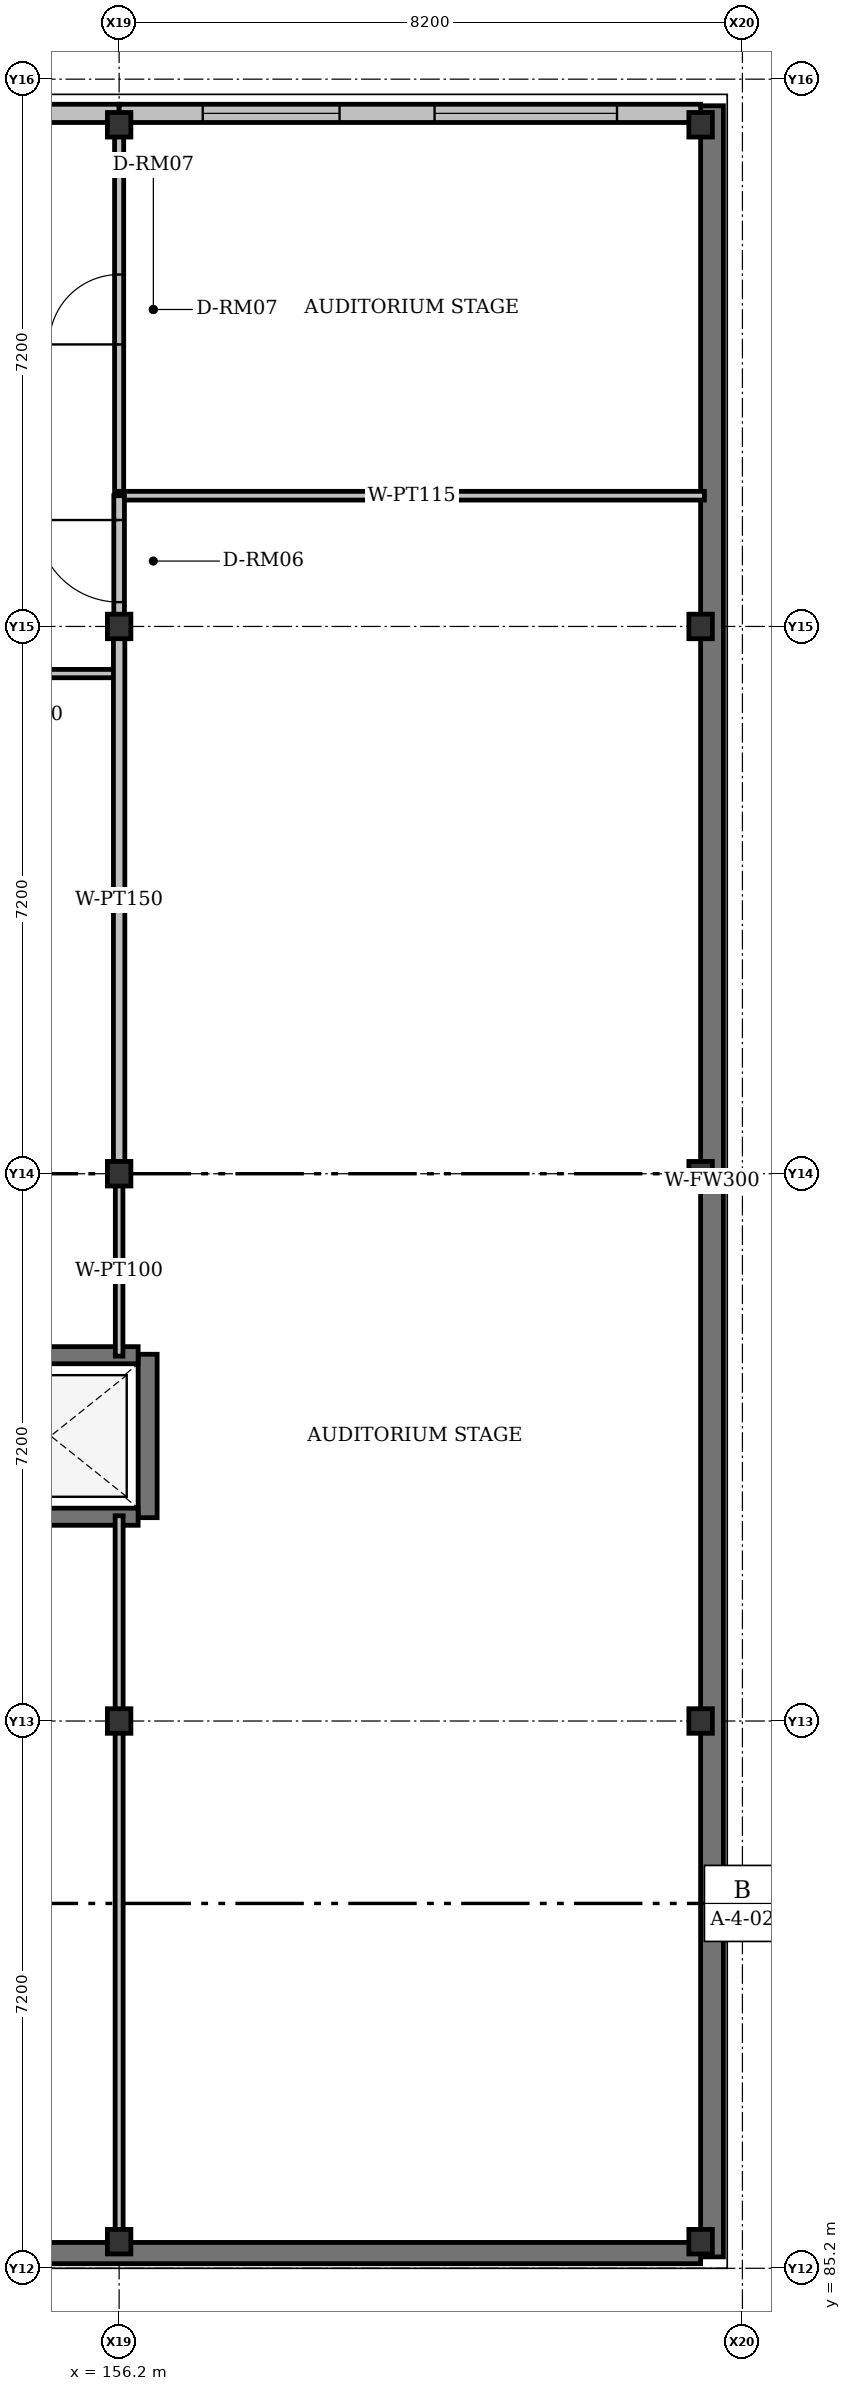
"""IFC4 building model, lengths in metres.
Left out: names, types, materials, properties, quantities, classifications, styles, units other than length and angle.
Written with IfcOpenShell. Run it as: python <this file> out.ifc"""

import sys

from ifc_helpers import new_model, si_unit, direction, frame, frame_2d, origin, origin_2d, place, context, subcontext, project, spatial, rectangle, i_section, extrude, element, fill, save


model = new_model("IFC4")
c1 = context("Model", 3, precision=1e-05, world=origin(), true_north=direction((0.0, 1.0)))
c2 = subcontext(c1, "Body", "Model", "MODEL_VIEW")
j1 = project(units=[si_unit("LENGTHUNIT", "METRE"), si_unit("PLANEANGLEUNIT", "RADIAN")], contexts=[c1])
p1 = place(None, origin())
s1 = spatial("IfcSite", under=j1, at=p1, CompositionType="ELEMENT")
p2 = place(p1, origin())
s2 = spatial("IfcBuilding", under=s1, at=p2, CompositionType="ELEMENT")
p3 = place(p2, origin())
s3 = spatial("IfcBuildingStorey", under=s2, at=p3, CompositionType="ELEMENT", Elevation=0.0)
for number, where, z_axis, x_axis in (
    (1, (156.2, 85.55, 0.0), (0.0, 0.0, 1.0), (1.0, 0.0, 0.0)),
    (2, (156.2, 92.4, 0.0), (0.0, 0.0, 1.0), (1.0, 0.0, 0.0)),
    (3, (156.2, 99.6, 0.0), (0.0, 0.0, 1.0), (1.0, 0.0, 0.0)),
    (4, (156.2, 106.8, 0.0), (0.0, 0.0, 1.0), (1.0, 0.0, 0.0)),
    (5, (156.2, 113.4, 0.0), (0.0, 0.0, 1.0), (1.0, 0.0, 0.0)),
    (6, (163.85, 85.55, 0.0), (0.0, 0.0, 1.0), (1.0, 0.0, 0.0)),
    (7, (163.85, 92.4, 0.0), (0.0, 0.0, 1.0), (1.0, 0.0, 0.0)),
    (8, (163.85, 99.6, 0.0), (0.0, 0.0, 1.0), (1.0, 0.0, 0.0)),
    (9, (163.85, 106.8, 0.0), (0.0, 0.0, 1.0), (1.0, 0.0, 0.0)),
    (10, (163.85, 113.4, 0.0), (0.0, 0.0, 1.0), (1.0, 0.0, 0.0)),
):
    element("IfcColumn", number, at=place(p3, frame(where, z_axis=z_axis, x_axis=x_axis)), inside=s3, PredefinedType="COLUMN", context=c2, shape_type="SweptSolid", body=[
        extrude(i_section(OverallWidth=0.309, OverallDepth=0.323, WebThickness=0.014, FlangeThickness=0.023, FilletRadius=0.015, at=origin_2d()), origin(), (0.0, 0.0, 1.0), 5.4),
    ])
p4 = place(p3, frame((164.0, 113.65, 0.0), z_axis=(0.0, 0.0, 1.0), x_axis=(0.0, -1.0, 0.0)))
e11 = element("IfcWall", 11, at=p4, inside=s3, PredefinedType="SOLIDWALL", context=c2, shape_type="SweptSolid", body=[
    extrude(rectangle(XDim=28.3, YDim=0.3, at=frame_2d((14.15, 0.0))), origin(), (0.0, 0.0, 1.0), 5.19),
])
p5 = place(p3, frame((163.85, 85.4, 0.0), z_axis=(0.0, 0.0, 1.0), x_axis=(-1.0, 0.0, 0.0)))
e12 = element("IfcWall", 12, at=p5, inside=s3, PredefinedType="SOLIDWALL", context=c2, shape_type="SweptSolid", body=[
    extrude(rectangle(XDim=40.25, YDim=0.28, at=frame_2d((20.125, 0.0))), origin(), (0.0, 0.0, 1.0), 5.19),
])
p6 = place(p3, frame((148.0, 113.55, 0.0), z_axis=(0.0, 0.0, 1.0), x_axis=(1.0, 0.0, 0.0)))
e13 = element("IfcWall", 13, at=p6, inside=s3, PredefinedType="SOLIDWALL", context=c2, shape_type="SweptSolid", body=[
    extrude(rectangle(XDim=8.2, YDim=0.24, at=frame_2d((4.1, 0.0))), origin(), (0.0, 0.0, 1.0), 4.7),
])
p7 = place(p6, frame((3.0, 0.0, 0.0)))
e14 = element("IfcOpeningElement", 14, at=p7, cuts=e13, PredefinedType="OPENING", context=c2, shape_type="SweptSolid", body=[
    extrude(rectangle(XDim=2.2, YDim=2.4, at=frame_2d((1.1, 1.2))), frame((0.0, 0.12, 0.0), z_axis=(0.0, -1.0, 0.0), x_axis=(1.0, 0.0, 0.0)), (0.0, 0.0, 1.0), 0.24),
])
p8 = place(p3, frame((156.2, 113.55, 0.0), z_axis=(0.0, 0.0, 1.0), x_axis=(1.0, 0.0, 0.0)))
e15 = element("IfcWall", 15, at=p8, inside=s3, PredefinedType="SOLIDWALL", context=c2, shape_type="SweptSolid", body=[
    extrude(rectangle(XDim=7.65, YDim=0.24, at=frame_2d((3.825, 0.0))), origin(), (0.0, 0.0, 1.0), 4.7),
])
p9 = place(p8, frame((1.1, 0.0, 0.92)))
e16 = element("IfcOpeningElement", 16, at=p9, cuts=e15, PredefinedType="OPENING", context=c2, shape_type="SweptSolid", body=[
    extrude(rectangle(XDim=1.8, YDim=1.55, at=frame_2d((0.9, 0.775))), frame((0.0, 0.12, 0.0), z_axis=(0.0, -1.0, 0.0), x_axis=(1.0, 0.0, 0.0)), (0.0, 0.0, 1.0), 0.24),
])
p10 = place(p8, frame((4.15, 0.0, 0.92)))
e17 = element("IfcOpeningElement", 17, at=p10, cuts=e15, PredefinedType="OPENING", context=c2, shape_type="SweptSolid", body=[
    extrude(rectangle(XDim=2.4, YDim=1.7, at=frame_2d((1.2, 0.85))), frame((0.0, 0.12, 0.0), z_axis=(0.0, -1.0, 0.0), x_axis=(1.0, 0.0, 0.0)), (0.0, 0.0, 1.0), 0.24),
])
p11 = place(p3, frame((156.575, 95.075, 0.0), z_axis=(0.0, 0.0, 1.0), x_axis=(0.0, 1.0, 0.0)))
e18 = element("IfcWall", 18, at=p11, inside=s3, PredefinedType="SHEAR", context=c2, shape_type="SweptSolid", body=[
    extrude(rectangle(XDim=2.15, YDim=0.25, at=frame_2d((1.075, 0.0))), origin(), (0.0, 0.0, 1.0), 5.4),
])
for number, where, z_axis, x_axis in (
    (19, (154.15, 95.087, 0.0), (0.0, 0.0, 1.0), (1.0, 0.0, 0.0)),
    (20, (154.15, 97.212, 0.0), (0.0, 0.0, 1.0), (1.0, 0.0, 0.0)),
):
    element("IfcWall", number, at=place(p3, frame(where, z_axis=z_axis, x_axis=x_axis)), inside=s3, PredefinedType="SHEAR", context=c2, shape_type="SweptSolid", body=[
        extrude(rectangle(XDim=2.3, YDim=0.225, at=frame_2d((1.15, 0.0))), origin(), (0.0, 0.0, 1.0), 5.4),
    ])
p12 = place(p3, frame((156.2, 108.52, 0.0), z_axis=(0.0, 0.0, 1.0), x_axis=(0.0, 1.0, 0.0)))
e21 = element("IfcWall", 21, at=p12, inside=s3, PredefinedType="PARTITIONING", context=c2, shape_type="SweptSolid", body=[
    extrude(rectangle(XDim=4.723, YDim=0.12, at=frame_2d((2.362, 0.0))), origin(), (0.0, 0.0, 1.0), 4.641),
])
p13 = place(p12, frame((1.99, 0.0, 0.0)))
e22 = element("IfcOpeningElement", 22, at=p13, cuts=e21, PredefinedType="OPENING", context=c2, shape_type="SweptSolid", body=[
    extrude(rectangle(XDim=0.92, YDim=2.15, at=frame_2d((0.46, 1.075))), frame((0.0, 0.06, 0.0), z_axis=(0.0, -1.0, 0.0), x_axis=(1.0, 0.0, 0.0)), (0.0, 0.0, 1.0), 0.12),
])
p14 = place(p3, frame((163.9, 108.52, 0.0), z_axis=(0.0, 0.0, 1.0), x_axis=(-1.0, 0.0, 0.0)))
e23 = element("IfcWall", 23, at=p14, inside=s3, PredefinedType="PARTITIONING", context=c2, shape_type="SweptSolid", body=[
    extrude(rectangle(XDim=7.7, YDim=0.115, at=frame_2d((3.85, 0.0))), origin(), (0.0, 0.0, 1.0), 4.641),
])
p15 = place(p3, frame((153.55, 106.18, 0.0), z_axis=(0.0, 0.0, 1.0), x_axis=(1.0, 0.0, 0.0)))
e24 = element("IfcWall", 24, at=p15, inside=s3, PredefinedType="PARTITIONING", context=c2, shape_type="SweptSolid", body=[
    extrude(rectangle(XDim=2.65, YDim=0.11, at=frame_2d((1.325, 0.0))), origin(), (0.0, 0.0, 1.0), 4.641),
])
p16 = place(p3, frame((156.2, 85.707, 0.0), z_axis=(0.0, 0.0, 1.0), x_axis=(0.0, 1.0, 0.0)))
e25 = element("IfcWall", 25, at=p16, inside=s3, PredefinedType="PARTITIONING", context=c2, shape_type="SweptSolid", body=[
    extrude(rectangle(XDim=9.394, YDim=0.105, at=frame_2d((4.697, 0.0))), origin(), (0.0, 0.0, 1.0), 4.641),
])
p17 = place(p3, frame((156.2, 97.2, 0.0), z_axis=(0.0, 0.0, 1.0), x_axis=(0.0, 1.0, 0.0)))
e26 = element("IfcWall", 26, at=p17, inside=s3, PredefinedType="PARTITIONING", context=c2, shape_type="SweptSolid", body=[
    extrude(rectangle(XDim=2.244, YDim=0.1, at=frame_2d((1.122, 0.0))), origin(), (0.0, 0.0, 1.0), 5.15),
])
p18 = place(p3, frame((156.2, 99.757, 0.0), z_axis=(0.0, 0.0, 1.0), x_axis=(0.0, 1.0, 0.0)))
e27 = element("IfcWall", 27, at=p18, inside=s3, PredefinedType="PARTITIONING", context=c2, shape_type="SweptSolid", body=[
    extrude(rectangle(XDim=6.887, YDim=0.15, at=frame_2d((3.443, 0.0))), origin(), (0.0, 0.0, 1.0), 4.641),
])
p19 = place(p3, frame((156.2, 106.957, 0.0), z_axis=(0.0, 0.0, 1.0), x_axis=(0.0, 1.0, 0.0)))
e28 = element("IfcWall", 28, at=p19, inside=s3, PredefinedType="PARTITIONING", context=c2, shape_type="SweptSolid", body=[
    extrude(rectangle(XDim=1.563, YDim=0.14, at=frame_2d((0.782, 0.0))), origin(), (0.0, 0.0, 1.0), 4.641),
])
p20 = place(p19, frame((0.164, 0.0, 0.0)))
e29 = element("IfcOpeningElement", 29, at=p20, cuts=e28, PredefinedType="OPENING", context=c2, shape_type="SweptSolid", body=[
    extrude(rectangle(XDim=1.08, YDim=2.1, at=frame_2d((0.54, 1.05))), frame((0.0, 0.07, 0.0), z_axis=(0.0, -1.0, 0.0), x_axis=(1.0, 0.0, 0.0)), (0.0, 0.0, 1.0), 0.14),
])
p21 = place(p9, origin())
e30 = element("IfcWindow", 30, at=p21, inside=s3, PartitioningType="DOUBLE_PANEL_VERTICAL", PredefinedType="WINDOW", context=c2, shape_type="SweptSolid", body=[
    extrude(rectangle(XDim=1.8, YDim=1.55, at=frame_2d((0.9, 0.775))), frame((0.0, 0.03, 0.0), z_axis=(0.0, -1.0, 0.0), x_axis=(1.0, 0.0, 0.0)), (0.0, 0.0, 1.0), 0.06),
])
fill(e16, e30)
p22 = place(p10, origin())
e31 = element("IfcWindow", 31, at=p22, inside=s3, PartitioningType="DOUBLE_PANEL_VERTICAL", PredefinedType="WINDOW", context=c2, shape_type="SweptSolid", body=[
    extrude(rectangle(XDim=2.4, YDim=1.7, at=frame_2d((1.2, 0.85))), frame((0.0, 0.03, 0.0), z_axis=(0.0, -1.0, 0.0), x_axis=(1.0, 0.0, 0.0)), (0.0, 0.0, 1.0), 0.06),
])
fill(e17, e31)
p23 = place(p13, origin())
e32 = element("IfcDoor", 32, at=p23, inside=s3, OperationType="SINGLE_SWING_LEFT", PredefinedType="DOOR", context=c2, shape_type="SweptSolid", body=[
    extrude(rectangle(XDim=0.92, YDim=2.15, at=frame_2d((0.46, 1.075))), frame((0.0, 0.025, 0.0), z_axis=(0.0, -1.0, 0.0), x_axis=(1.0, 0.0, 0.0)), (0.0, 0.0, 1.0), 0.05),
])
fill(e22, e32)
p24 = place(p20, origin())
e33 = element("IfcDoor", 33, at=p24, inside=s3, OperationType="SINGLE_SWING_RIGHT", PredefinedType="DOOR", context=c2, shape_type="SweptSolid", body=[
    extrude(rectangle(XDim=1.08, YDim=2.1, at=frame_2d((0.54, 1.05))), frame((0.0, 0.025, 0.0), z_axis=(0.0, -1.0, 0.0), x_axis=(1.0, 0.0, 0.0)), (0.0, 0.0, 1.0), 0.05),
])
fill(e29, e33)
save(model, sys.argv[1])
